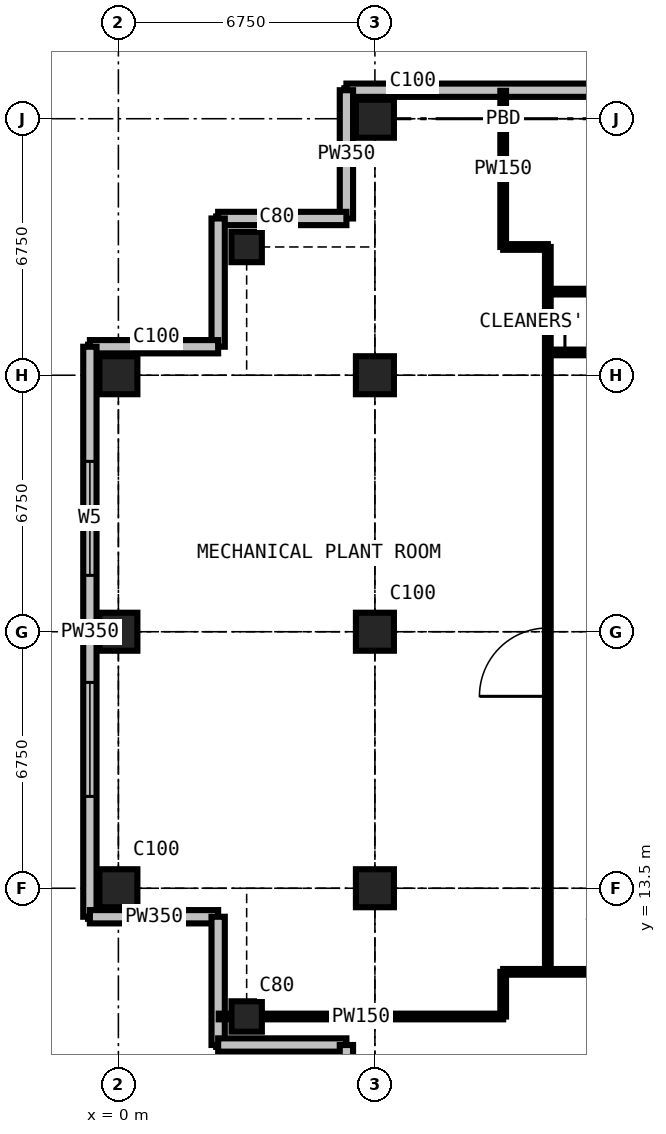
"""IFC4 building model, lengths in metres.
Left out: names, types, materials, properties, quantities, classifications, styles, units other than length and angle.
Written with IfcOpenShell. Run it as: python <this file> out.ifc"""

import sys

from ifc_helpers import new_model, si_unit, direction, frame, frame_2d, origin, origin_2d, place, context, subcontext, project, spatial, rectangle, extrude, element, fill, save


model = new_model("IFC4")
c1 = context("Model", 3, precision=1e-05, world=origin(), true_north=direction((0.0, 1.0)))
c2 = subcontext(c1, "Body", "Model", "MODEL_VIEW")
j1 = project(units=[si_unit("LENGTHUNIT", "METRE"), si_unit("PLANEANGLEUNIT", "RADIAN")], contexts=[c1])
p1 = place(None, origin())
s1 = spatial("IfcSite", under=j1, at=p1, CompositionType="ELEMENT")
p2 = place(p1, origin())
s2 = spatial("IfcBuilding", under=s1, at=p2, CompositionType="ELEMENT")
p3 = place(p2, frame((0.0, 0.0, 254.7)))
s3 = spatial("IfcBuildingStorey", under=s2, at=p3, CompositionType="ELEMENT", Elevation=254.7)
for number, where, z_axis, x_axis in (
    (1, (0.0, 13.5, 0.0), (0.0, 0.0, 1.0), (1.0, 0.0, 0.0)),
    (2, (0.0, 20.25, 0.0), (0.0, 0.0, 1.0), (1.0, 0.0, 0.0)),
    (3, (0.0, 27.0, 0.0), (0.0, 0.0, 1.0), (1.0, 0.0, 0.0)),
):
    element("IfcColumn", number, at=place(p3, frame(where, z_axis=z_axis, x_axis=x_axis)), inside=s3, PredefinedType="COLUMN", context=c2, shape_type="SweptSolid", body=[
        extrude(rectangle(XDim=1.0, YDim=1.0, at=origin_2d()), origin(), (0.0, 0.0, 1.0), 4.5),
    ])
for number, where, z_axis, x_axis in (
    (4, (3.375, 10.125, 0.0), (0.0, 0.0, 1.0), (1.0, 0.0, 0.0)),
    (5, (3.375, 30.375, 0.0), (0.0, 0.0, 1.0), (1.0, 0.0, 0.0)),
):
    element("IfcColumn", number, at=place(p3, frame(where, z_axis=z_axis, x_axis=x_axis)), inside=s3, PredefinedType="COLUMN", context=c2, shape_type="SweptSolid", body=[
        extrude(rectangle(XDim=0.8, YDim=0.8, at=origin_2d()), origin(), (0.0, 0.0, 1.0), 4.5),
    ])
for number, where, z_axis, x_axis in (
    (6, (6.75, 13.5, 0.0), (0.0, 0.0, 1.0), (1.0, 0.0, 0.0)),
    (7, (6.75, 20.25, 0.0), (0.0, 0.0, 1.0), (1.0, 0.0, 0.0)),
    (8, (6.75, 27.0, 0.0), (0.0, 0.0, 1.0), (1.0, 0.0, 0.0)),
    (9, (6.75, 33.75, 0.0), (0.0, 0.0, 1.0), (1.0, 0.0, 0.0)),
):
    element("IfcColumn", number, at=place(p3, frame(where, z_axis=z_axis, x_axis=x_axis)), inside=s3, PredefinedType="COLUMN", context=c2, shape_type="SweptSolid", body=[
        extrude(rectangle(XDim=1.0, YDim=1.0, at=origin_2d()), origin(), (0.0, 0.0, 1.0), 4.5),
    ])
p4 = place(p3, frame((27.75, 34.5, 0.0), z_axis=(0.0, 0.0, 1.0), x_axis=(-1.0, 0.0, 0.0)))
e10 = element("IfcWall", 10, at=p4, inside=s3, PredefinedType="SOLIDWALL", context=c2, shape_type="SweptSolid", body=[
    extrude(rectangle(XDim=21.75, YDim=0.35, at=frame_2d((10.875, 0.0))), origin(), (0.0, 0.0, 1.0), 5.6),
])
p5 = place(p4, frame((1.05, 0.0, 0.9)))
e11 = element("IfcOpeningElement", 11, at=p5, cuts=e10, PredefinedType="OPENING", context=c2, shape_type="SweptSolid", body=[
    extrude(rectangle(XDim=3.0, YDim=3.0, at=frame_2d((1.5, 1.5))), frame((0.0, 0.185, 0.0), z_axis=(0.0, -1.0, 0.0), x_axis=(1.0, 0.0, 0.0)), (0.0, 0.0, 1.0), 0.37),
])
p6 = place(p4, frame((4.9, 0.0, 0.9)))
e12 = element("IfcOpeningElement", 12, at=p6, cuts=e10, PredefinedType="OPENING", context=c2, shape_type="SweptSolid", body=[
    extrude(rectangle(XDim=3.0, YDim=3.0, at=frame_2d((1.5, 1.5))), frame((0.0, 0.185, 0.0), z_axis=(0.0, -1.0, 0.0), x_axis=(1.0, 0.0, 0.0)), (0.0, 0.0, 1.0), 0.37),
])
p7 = place(p4, frame((8.75, 0.0, 0.9)))
e13 = element("IfcOpeningElement", 13, at=p7, cuts=e10, PredefinedType="OPENING", context=c2, shape_type="SweptSolid", body=[
    extrude(rectangle(XDim=3.0, YDim=3.0, at=frame_2d((1.5, 1.5))), frame((0.0, 0.185, 0.0), z_axis=(0.0, -1.0, 0.0), x_axis=(1.0, 0.0, 0.0)), (0.0, 0.0, 1.0), 0.37),
])
for number, where, z_axis, x_axis in (
    (14, (6.0, 34.5, 0.0), (0.0, 0.0, 1.0), (0.0, -1.0, 0.0)),
    (15, (6.0, 31.125, 0.0), (0.0, 0.0, 1.0), (-1.0, 0.0, 0.0)),
    (16, (2.625, 31.125, 0.0), (0.0, 0.0, 1.0), (0.0, -1.0, 0.0)),
    (17, (2.625, 27.75, 0.0), (0.0, 0.0, 1.0), (-1.0, 0.0, 0.0)),
):
    element("IfcWall", number, at=place(p3, frame(where, z_axis=z_axis, x_axis=x_axis)), inside=s3, PredefinedType="SOLIDWALL", context=c2, shape_type="SweptSolid", body=[
        extrude(rectangle(XDim=3.375, YDim=0.35, at=frame_2d((1.688, 0.0))), origin(), (0.0, 0.0, 1.0), 5.6),
    ])
p8 = place(p3, frame((-0.75, 27.75, 0.0), z_axis=(0.0, 0.0, 1.0), x_axis=(0.0, -1.0, 0.0)))
e18 = element("IfcWall", 18, at=p8, inside=s3, PredefinedType="SOLIDWALL", context=c2, shape_type="SweptSolid", body=[
    extrude(rectangle(XDim=15.0, YDim=0.35, at=frame_2d((7.5, 0.0))), origin(), (0.0, 0.0, 1.0), 5.6),
])
p9 = place(p8, frame((3.017, 0.0, 0.9)))
e19 = element("IfcOpeningElement", 19, at=p9, cuts=e18, PredefinedType="OPENING", context=c2, shape_type="SweptSolid", body=[
    extrude(rectangle(XDim=3.0, YDim=3.0, at=frame_2d((1.5, 1.5))), frame((0.0, 0.185, 0.0), z_axis=(0.0, -1.0, 0.0), x_axis=(1.0, 0.0, 0.0)), (0.0, 0.0, 1.0), 0.37),
])
p10 = place(p8, frame((8.833, 0.0, 0.9)))
e20 = element("IfcOpeningElement", 20, at=p10, cuts=e18, PredefinedType="OPENING", context=c2, shape_type="SweptSolid", body=[
    extrude(rectangle(XDim=3.0, YDim=3.0, at=frame_2d((1.5, 1.5))), frame((0.0, 0.185, 0.0), z_axis=(0.0, -1.0, 0.0), x_axis=(1.0, 0.0, 0.0)), (0.0, 0.0, 1.0), 0.37),
])
for number, where, z_axis, x_axis in (
    (21, (-0.75, 12.75, 0.0), (0.0, 0.0, 1.0), (1.0, 0.0, 0.0)),
    (22, (2.625, 12.75, 0.0), (0.0, 0.0, 1.0), (0.0, -1.0, 0.0)),
    (23, (2.625, 9.375, 0.0), (0.0, 0.0, 1.0), (1.0, 0.0, 0.0)),
    (24, (6.0, 9.375, 0.0), (0.0, 0.0, 1.0), (0.0, -1.0, 0.0)),
):
    element("IfcWall", number, at=place(p3, frame(where, z_axis=z_axis, x_axis=x_axis)), inside=s3, PredefinedType="SOLIDWALL", context=c2, shape_type="SweptSolid", body=[
        extrude(rectangle(XDim=3.375, YDim=0.35, at=frame_2d((1.688, 0.0))), origin(), (0.0, 0.0, 1.0), 5.6),
    ])
p11 = place(p3, frame((2.641, 10.125, 0.0), z_axis=(0.0, 0.0, 1.0), x_axis=(1.0, 0.0, 0.0)))
e25 = element("IfcWall", 25, at=p11, inside=s3, PredefinedType="PARTITIONING", context=c2, shape_type="SweptSolid", body=[
    extrude(rectangle(XDim=7.484, YDim=0.15, at=frame_2d((3.742, 0.0))), origin(), (0.0, 0.0, 1.0), 3.652),
])
p12 = place(p3, frame((10.125, 10.125, 0.0), z_axis=(0.0, 0.0, 1.0), x_axis=(0.0, 1.0, 0.0)))
e26 = element("IfcWall", 26, at=p12, inside=s3, PredefinedType="PARTITIONING", context=c2, shape_type="SweptSolid", body=[
    extrude(rectangle(XDim=1.175, YDim=0.15, at=frame_2d((0.587, 0.0))), origin(), (0.0, 0.0, 1.0), 4.15),
])
p13 = place(p3, frame((10.125, 11.3, 0.0), z_axis=(0.0, 0.0, 1.0), x_axis=(1.0, 0.0, 0.0)))
e27 = element("IfcWall", 27, at=p13, inside=s3, PredefinedType="PARTITIONING", context=c2, shape_type="SweptSolid", body=[
    extrude(rectangle(XDim=20.25, YDim=0.15, at=frame_2d((10.125, 0.0))), origin(), (0.0, 0.0, 1.0), 4.15),
])
p14 = place(p13, frame((9.225, 0.0, 0.0)))
e28 = element("IfcOpeningElement", 28, at=p14, cuts=e27, PredefinedType="OPENING", context=c2, shape_type="SweptSolid", body=[
    extrude(rectangle(XDim=1.8, YDim=2.4, at=frame_2d((0.9, 1.2))), frame((0.0, 0.085, 0.0), z_axis=(0.0, -1.0, 0.0), x_axis=(1.0, 0.0, 0.0)), (0.0, 0.0, 1.0), 0.17),
])
p15 = place(p3, frame((10.125, 30.375, 0.0), z_axis=(0.0, 0.0, 1.0), x_axis=(0.0, 1.0, 0.0)))
e29 = element("IfcWall", 29, at=p15, inside=s3, PredefinedType="PARTITIONING", context=c2, shape_type="SweptSolid", body=[
    extrude(rectangle(XDim=4.109, YDim=0.15, at=frame_2d((2.054, 0.0))), origin(), (0.0, 0.0, 1.0), 4.15),
])
p16 = place(p3, frame((10.125, 30.375, 0.0), z_axis=(0.0, 0.0, 1.0), x_axis=(1.0, 0.0, 0.0)))
e30 = element("IfcWall", 30, at=p16, inside=s3, PredefinedType="PARTITIONING", context=c2, shape_type="SweptSolid", body=[
    extrude(rectangle(XDim=1.175, YDim=0.15, at=frame_2d((0.587, 0.0))), origin(), (0.0, 0.0, 1.0), 4.15),
])
p17 = place(p3, frame((11.3, 11.3, 0.0), z_axis=(0.0, 0.0, 1.0), x_axis=(0.0, 1.0, 0.0)))
e31 = element("IfcWall", 31, at=p17, inside=s3, PredefinedType="PARTITIONING", context=c2, shape_type="SweptSolid", body=[
    extrude(rectangle(XDim=19.075, YDim=0.15, at=frame_2d((9.538, 0.0))), origin(), (0.0, 0.0, 1.0), 4.15),
])
p18 = place(p17, frame((7.25, 0.0, 0.0)))
e32 = element("IfcOpeningElement", 32, at=p18, cuts=e31, PredefinedType="OPENING", context=c2, shape_type="SweptSolid", body=[
    extrude(rectangle(XDim=1.8, YDim=2.4, at=frame_2d((0.9, 1.2))), frame((0.0, 0.085, 0.0), z_axis=(0.0, -1.0, 0.0), x_axis=(1.0, 0.0, 0.0)), (0.0, 0.0, 1.0), 0.17),
])
p19 = place(p3, frame((11.3, 27.6, 0.0), z_axis=(0.0, 0.0, 1.0), x_axis=(1.0, 0.0, 0.0)))
e33 = element("IfcWall", 33, at=p19, inside=s3, PredefinedType="PARTITIONING", context=c2, shape_type="SweptSolid", body=[
    extrude(rectangle(XDim=1.9, YDim=0.15, at=frame_2d((0.95, 0.0))), origin(), (0.0, 0.0, 1.0), 3.652),
])
p20 = place(p19, frame((0.45, 0.0, 0.0)))
e34 = element("IfcOpeningElement", 34, at=p20, cuts=e33, PredefinedType="OPENING", context=c2, shape_type="SweptSolid", body=[
    extrude(rectangle(XDim=0.95, YDim=2.2, at=frame_2d((0.475, 1.1))), frame((0.0, 0.085, 0.0), z_axis=(0.0, -1.0, 0.0), x_axis=(1.0, 0.0, 0.0)), (0.0, 0.0, 1.0), 0.17),
])
p21 = place(p3, frame((11.3, 29.2, 0.0), z_axis=(0.0, 0.0, 1.0), x_axis=(1.0, 0.0, 0.0)))
e35 = element("IfcWall", 35, at=p21, inside=s3, PredefinedType="PARTITIONING", context=c2, shape_type="SweptSolid", body=[
    extrude(rectangle(XDim=19.075, YDim=0.15, at=frame_2d((9.538, 0.0))), origin(), (0.0, 0.0, 1.0), 4.15),
])
p22 = place(p21, frame((9.0, 0.0, 0.0)))
e36 = element("IfcOpeningElement", 36, at=p22, cuts=e35, PredefinedType="OPENING", context=c2, shape_type="SweptSolid", body=[
    extrude(rectangle(XDim=1.8, YDim=2.4, at=frame_2d((0.9, 1.2))), frame((0.0, 0.085, 0.0), z_axis=(0.0, -1.0, 0.0), x_axis=(1.0, 0.0, 0.0)), (0.0, 0.0, 1.0), 0.17),
])
p23 = place(p9, origin())
e37 = element("IfcWindow", 37, at=p23, inside=s3, PartitioningType="SINGLE_PANEL", PredefinedType="WINDOW", context=c2, shape_type="SweptSolid", body=[
    extrude(rectangle(XDim=3.0, YDim=3.0, at=frame_2d((1.5, 1.5))), frame((0.0, 0.03, 0.0), z_axis=(0.0, -1.0, 0.0), x_axis=(1.0, 0.0, 0.0)), (0.0, 0.0, 1.0), 0.06),
])
fill(e19, e37)
p24 = place(p10, origin())
e38 = element("IfcWindow", 38, at=p24, inside=s3, PartitioningType="SINGLE_PANEL", PredefinedType="WINDOW", context=c2, shape_type="SweptSolid", body=[
    extrude(rectangle(XDim=3.0, YDim=3.0, at=frame_2d((1.5, 1.5))), frame((0.0, 0.03, 0.0), z_axis=(0.0, -1.0, 0.0), x_axis=(1.0, 0.0, 0.0)), (0.0, 0.0, 1.0), 0.06),
])
fill(e20, e38)
p25 = place(p20, origin())
e39 = element("IfcDoor", 39, at=p25, inside=s3, OperationType="SINGLE_SWING_LEFT", PredefinedType="DOOR", context=c2, shape_type="SweptSolid", body=[
    extrude(rectangle(XDim=0.95, YDim=2.2, at=frame_2d((0.475, 1.1))), frame((0.0, 0.025, 0.0), z_axis=(0.0, -1.0, 0.0), x_axis=(1.0, 0.0, 0.0)), (0.0, 0.0, 1.0), 0.05),
])
fill(e34, e39)
p26 = place(p18, origin())
e40 = element("IfcDoor", 40, at=p26, inside=s3, OperationType="DOUBLE_DOOR_SINGLE_SWING", PredefinedType="DOOR", context=c2, shape_type="SweptSolid", body=[
    extrude(rectangle(XDim=1.8, YDim=2.4, at=frame_2d((0.9, 1.2))), frame((0.0, 0.025, 0.0), z_axis=(0.0, -1.0, 0.0), x_axis=(1.0, 0.0, 0.0)), (0.0, 0.0, 1.0), 0.05),
])
fill(e32, e40)
save(model, sys.argv[1])
